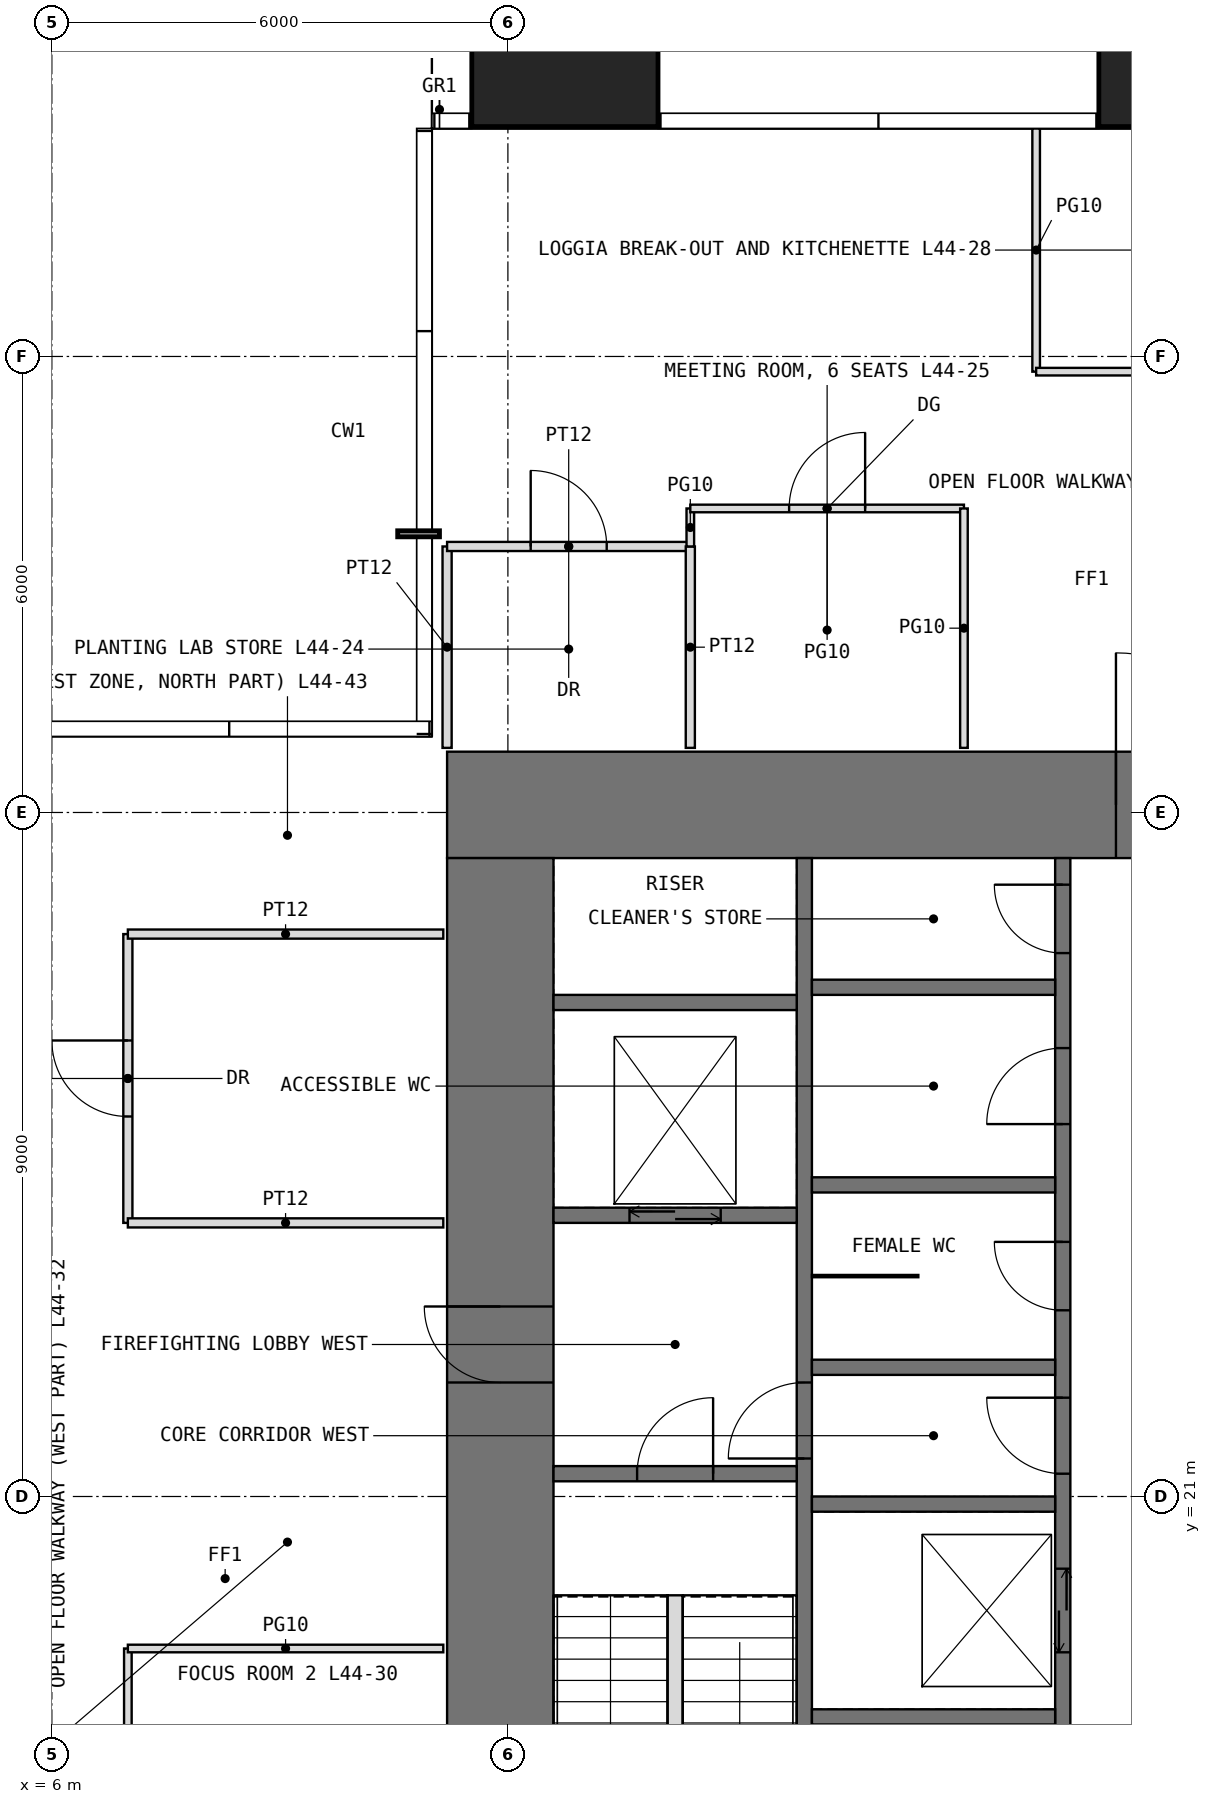
"""IFC4 building model, lengths in metres.
Left out: names, types, materials, properties, quantities, classifications, styles, units other than length and angle.
Written with IfcOpenShell. Run it as: python <this file> out.ifc"""

import sys

from ifc_helpers import new_model, si_unit, direction, frame, frame_2d, origin, origin_2d, place, context, subcontext, project, spatial, rectangle, extrude, element, fill, save


model = new_model("IFC4")
c1 = context("Model", 3, precision=1e-05, world=origin(), true_north=direction((0.0, 1.0)))
c2 = subcontext(c1, "Body", "Model", "MODEL_VIEW")
j1 = project(units=[si_unit("LENGTHUNIT", "METRE"), si_unit("PLANEANGLEUNIT", "RADIAN")], contexts=[c1])
p1 = place(None, origin())
s1 = spatial("IfcSite", under=j1, at=p1, CompositionType="ELEMENT")
p2 = place(p1, origin())
s2 = spatial("IfcBuilding", under=s1, at=p2, CompositionType="ELEMENT")
p3 = place(p2, frame((0.0, 0.0, 186.5)))
s3 = spatial("IfcBuildingStorey", under=s2, at=p3, CompositionType="ELEMENT", Elevation=186.5)
for number, where, z_axis, x_axis in (
    (1, (12.75, 40.25, 0.0), (0.0, 0.0, 1.0), (1.0, 0.0, 0.0)),
    (2, (21.0, 40.25, 0.0), (0.0, 0.0, 1.0), (1.0, 0.0, 0.0)),
):
    element("IfcColumn", number, at=place(p3, frame(where, z_axis=z_axis, x_axis=x_axis)), inside=s3, PredefinedType="COLUMN", context=c2, shape_type="SweptSolid", body=[
        extrude(rectangle(XDim=2.45, YDim=2.45, at=origin_2d()), origin(), (0.0, 0.0, 1.0), 4.0),
    ])
p4 = place(p3, frame((11.2, 30.1, -0.05), z_axis=(0.0, 0.0, 1.0), x_axis=(1.0, 0.0, 0.0)))
e3 = element("IfcWall", 3, at=p4, inside=s3, PredefinedType="SHEAR", context=c2, shape_type="SweptSolid", body=[
    extrude(rectangle(XDim=19.6, YDim=1.4, at=frame_2d((9.8, 0.0))), origin(), (0.0, 0.0, 1.0), 4.0),
])
p5 = place(p4, frame((8.8, 0.0, 0.05)))
e4 = element("IfcOpeningElement", 4, at=p5, cuts=e3, PredefinedType="OPENING", context=c2, shape_type="SweptSolid", body=[
    extrude(rectangle(XDim=2.0, YDim=2.2, at=frame_2d((1.0, 1.1))), frame((0.0, 0.71, 0.0), z_axis=(0.0, -1.0, 0.0), x_axis=(1.0, 0.0, 0.0)), (0.0, 0.0, 1.0), 1.42),
])
p6 = place(p3, frame((11.9, 12.6, -0.05), z_axis=(0.0, 0.0, 1.0), x_axis=(0.0, 1.0, 0.0)))
e5 = element("IfcWall", 5, at=p6, inside=s3, PredefinedType="SHEAR", context=c2, shape_type="SweptSolid", body=[
    extrude(rectangle(XDim=16.8, YDim=1.4, at=frame_2d((8.4, 0.0))), origin(), (0.0, 0.0, 1.0), 4.0),
])
p7 = place(p6, frame((9.9, 0.0, 0.05)))
e6 = element("IfcOpeningElement", 6, at=p7, cuts=e5, PredefinedType="OPENING", context=c2, shape_type="SweptSolid", body=[
    extrude(rectangle(XDim=1.0, YDim=2.2, at=frame_2d((0.5, 1.1))), frame((0.0, 0.71, 0.0), z_axis=(0.0, -1.0, 0.0), x_axis=(1.0, 0.0, 0.0)), (0.0, 0.0, 1.0), 1.42),
])
p8 = place(p3, frame((15.9, 12.6, -0.05), z_axis=(0.0, 0.0, 1.0), x_axis=(0.0, 1.0, 0.0)))
e7 = element("IfcWall", 7, at=p8, inside=s3, PredefinedType="SHEAR", context=c2, shape_type="SweptSolid", body=[
    extrude(rectangle(XDim=16.8, YDim=0.2, at=frame_2d((8.4, 0.0))), origin(), (0.0, 0.0, 1.0), 4.0),
])
p9 = place(p8, frame((8.9, 0.0, 0.05)))
e8 = element("IfcOpeningElement", 8, at=p9, cuts=e7, PredefinedType="OPENING", context=c2, shape_type="SweptSolid", body=[
    extrude(rectangle(XDim=1.0, YDim=2.2, at=frame_2d((0.5, 1.1))), frame((0.0, 0.11, 0.0), z_axis=(0.0, -1.0, 0.0), x_axis=(1.0, 0.0, 0.0)), (0.0, 0.0, 1.0), 0.22),
])
p10 = place(p3, frame((19.3, 12.6, -0.05), z_axis=(0.0, 0.0, 1.0), x_axis=(0.0, 1.0, 0.0)))
e9 = element("IfcWall", 9, at=p10, inside=s3, PredefinedType="SHEAR", context=c2, shape_type="SweptSolid", body=[
    extrude(rectangle(XDim=16.8, YDim=0.2, at=frame_2d((8.4, 0.0))), origin(), (0.0, 0.0, 1.0), 4.0),
])
p11 = place(p10, frame((8.7, 0.0, 0.05)))
e10 = element("IfcOpeningElement", 10, at=p11, cuts=e9, PredefinedType="OPENING", context=c2, shape_type="SweptSolid", body=[
    extrude(rectangle(XDim=1.0, YDim=2.2, at=frame_2d((0.5, 1.1))), frame((0.0, 0.11, 0.0), z_axis=(0.0, -1.0, 0.0), x_axis=(1.0, 0.0, 0.0)), (0.0, 0.0, 1.0), 0.22),
])
p12 = place(p10, frame((10.85, 0.0, 0.05)))
e11 = element("IfcOpeningElement", 11, at=p12, cuts=e9, PredefinedType="OPENING", context=c2, shape_type="SweptSolid", body=[
    extrude(rectangle(XDim=0.9, YDim=2.2, at=frame_2d((0.45, 1.1))), frame((0.0, 0.11, 0.0), z_axis=(0.0, -1.0, 0.0), x_axis=(1.0, 0.0, 0.0)), (0.0, 0.0, 1.0), 0.22),
])
p13 = place(p10, frame((13.3, 0.0, 0.05)))
e12 = element("IfcOpeningElement", 12, at=p13, cuts=e9, PredefinedType="OPENING", context=c2, shape_type="SweptSolid", body=[
    extrude(rectangle(XDim=1.0, YDim=2.2, at=frame_2d((0.5, 1.1))), frame((0.0, 0.11, 0.0), z_axis=(0.0, -1.0, 0.0), x_axis=(1.0, 0.0, 0.0)), (0.0, 0.0, 1.0), 0.22),
])
p14 = place(p10, frame((15.55, 0.0, 0.05)))
e13 = element("IfcOpeningElement", 13, at=p14, cuts=e9, PredefinedType="OPENING", context=c2, shape_type="SweptSolid", body=[
    extrude(rectangle(XDim=0.9, YDim=2.2, at=frame_2d((0.45, 1.1))), frame((0.0, 0.11, 0.0), z_axis=(0.0, -1.0, 0.0), x_axis=(1.0, 0.0, 0.0)), (0.0, 0.0, 1.0), 0.22),
])
p15 = place(p10, frame((0.75, 0.0, 0.05)))
e14 = element("IfcOpeningElement", 14, at=p15, cuts=e9, PredefinedType="OPENING", context=c2, shape_type="SweptSolid", body=[
    extrude(rectangle(XDim=1.1, YDim=2.2, at=frame_2d((0.55, 1.1))), frame((0.0, 0.11, 0.0), z_axis=(0.0, -1.0, 0.0), x_axis=(1.0, 0.0, 0.0)), (0.0, 0.0, 1.0), 0.22),
])
p16 = place(p10, frame((3.55, 0.0, 0.05)))
e15 = element("IfcOpeningElement", 15, at=p16, cuts=e9, PredefinedType="OPENING", context=c2, shape_type="SweptSolid", body=[
    extrude(rectangle(XDim=1.1, YDim=2.2, at=frame_2d((0.55, 1.1))), frame((0.0, 0.11, 0.0), z_axis=(0.0, -1.0, 0.0), x_axis=(1.0, 0.0, 0.0)), (0.0, 0.0, 1.0), 0.22),
])
p17 = place(p10, frame((6.35, 0.0, 0.05)))
e16 = element("IfcOpeningElement", 16, at=p17, cuts=e9, PredefinedType="OPENING", context=c2, shape_type="SweptSolid", body=[
    extrude(rectangle(XDim=1.1, YDim=2.2, at=frame_2d((0.55, 1.1))), frame((0.0, 0.11, 0.0), z_axis=(0.0, -1.0, 0.0), x_axis=(1.0, 0.0, 0.0)), (0.0, 0.0, 1.0), 0.22),
])
p18 = place(p3, frame((12.6, 21.3, -0.05), z_axis=(0.0, 0.0, 1.0), x_axis=(1.0, 0.0, 0.0)))
e17 = element("IfcWall", 17, at=p18, inside=s3, PredefinedType="SHEAR", context=c2, shape_type="SweptSolid", body=[
    extrude(rectangle(XDim=3.2, YDim=0.2, at=frame_2d((1.6, 0.0))), origin(), (0.0, 0.0, 1.0), 4.0),
])
p19 = place(p18, frame((1.1, 0.0, 0.05)))
e18 = element("IfcOpeningElement", 18, at=p19, cuts=e17, PredefinedType="OPENING", context=c2, shape_type="SweptSolid", body=[
    extrude(rectangle(XDim=1.0, YDim=2.2, at=frame_2d((0.5, 1.1))), frame((0.0, 0.11, 0.0), z_axis=(0.0, -1.0, 0.0), x_axis=(1.0, 0.0, 0.0)), (0.0, 0.0, 1.0), 0.22),
])
p20 = place(p3, frame((12.6, 24.7, -0.05), z_axis=(0.0, 0.0, 1.0), x_axis=(1.0, 0.0, 0.0)))
e19 = element("IfcWall", 19, at=p20, inside=s3, PredefinedType="SHEAR", context=c2, shape_type="SweptSolid", body=[
    extrude(rectangle(XDim=3.2, YDim=0.2, at=frame_2d((1.6, 0.0))), origin(), (0.0, 0.0, 1.0), 4.0),
])
p21 = place(p20, frame((1.0, 0.0, 0.05)))
e20 = element("IfcOpeningElement", 20, at=p21, cuts=e19, PredefinedType="OPENING", context=c2, shape_type="SweptSolid", body=[
    extrude(rectangle(XDim=1.2, YDim=2.2, at=frame_2d((0.6, 1.1))), frame((0.0, 0.11, 0.0), z_axis=(0.0, -1.0, 0.0), x_axis=(1.0, 0.0, 0.0)), (0.0, 0.0, 1.0), 0.22),
])
for number, where, z_axis, x_axis in (
    (21, (12.6, 27.5, -0.05), (0.0, 0.0, 1.0), (1.0, 0.0, 0.0)),
    (22, (16.0, 18.1, -0.05), (0.0, 0.0, 1.0), (1.0, 0.0, 0.0)),
    (23, (16.0, 20.9, -0.05), (0.0, 0.0, 1.0), (1.0, 0.0, 0.0)),
    (24, (16.0, 22.7, -0.05), (0.0, 0.0, 1.0), (1.0, 0.0, 0.0)),
    (25, (16.0, 25.1, -0.05), (0.0, 0.0, 1.0), (1.0, 0.0, 0.0)),
    (26, (16.0, 27.7, -0.05), (0.0, 0.0, 1.0), (1.0, 0.0, 0.0)),
):
    element("IfcWall", number, at=place(p3, frame(where, z_axis=z_axis, x_axis=x_axis)), inside=s3, PredefinedType="SHEAR", context=c2, shape_type="SweptSolid", body=[
        extrude(rectangle(XDim=3.2, YDim=0.2, at=frame_2d((1.6, 0.0))), origin(), (0.0, 0.0, 1.0), 4.0),
    ])
p22 = place(p3, frame((16.0, 23.9, 0.0), z_axis=(0.0, 0.0, 1.0), x_axis=(1.0, 0.0, 0.0)))
e27 = element("IfcWall", 27, at=p22, inside=s3, PredefinedType="PARTITIONING", context=c2, shape_type="SweptSolid", body=[
    extrude(rectangle(XDim=1.4, YDim=0.03, at=frame_2d((0.7, 0.0))), origin(), (0.0, 0.0, 1.0), 3.75),
])
p23 = place(p3, frame((7.0, 15.4, 0.0), z_axis=(0.0, 0.0, 1.0), x_axis=(0.0, 1.0, 0.0)))
e28 = element("IfcWall", 28, at=p23, inside=s3, PredefinedType="PARTITIONING", context=c2, shape_type="SweptSolid", body=[
    extrude(rectangle(XDim=3.6, YDim=0.1, at=frame_2d((1.8, 0.0))), origin(), (0.0, 0.0, 1.0), 3.75),
])
p24 = place(p23, frame((1.3, 0.0, 0.0)))
e29 = element("IfcOpeningElement", 29, at=p24, cuts=e28, PredefinedType="OPENING", context=c2, shape_type="SweptSolid", body=[
    extrude(rectangle(XDim=1.0, YDim=2.4, at=frame_2d((0.5, 1.2))), frame((0.0, 0.06, 0.0), z_axis=(0.0, -1.0, 0.0), x_axis=(1.0, 0.0, 0.0)), (0.0, 0.0, 1.0), 0.12),
])
p25 = place(p3, frame((7.0, 19.0, 0.0), z_axis=(0.0, 0.0, 1.0), x_axis=(1.0, 0.0, 0.0)))
e30 = element("IfcWall", 30, at=p25, inside=s3, PredefinedType="PARTITIONING", context=c2, shape_type="SweptSolid", body=[
    extrude(rectangle(XDim=4.15, YDim=0.1, at=frame_2d((2.075, 0.0))), origin(), (0.0, 0.0, 1.0), 3.75),
])
p26 = place(p3, frame((7.0, 24.6, 0.0), z_axis=(0.0, 0.0, 1.0), x_axis=(0.0, 1.0, 0.0)))
e31 = element("IfcWall", 31, at=p26, inside=s3, PredefinedType="PARTITIONING", context=c2, shape_type="SweptSolid", body=[
    extrude(rectangle(XDim=3.8, YDim=0.12, at=frame_2d((1.9, 0.0))), origin(), (0.0, 0.0, 1.0), 3.75),
])
p27 = place(p26, frame((1.4, 0.0, 0.0)))
e32 = element("IfcOpeningElement", 32, at=p27, cuts=e31, PredefinedType="OPENING", context=c2, shape_type="SweptSolid", body=[
    extrude(rectangle(XDim=1.0, YDim=2.2, at=frame_2d((0.5, 1.1))), frame((0.0, 0.07, 0.0), z_axis=(0.0, -1.0, 0.0), x_axis=(1.0, 0.0, 0.0)), (0.0, 0.0, 1.0), 0.14),
])
for number, where, z_axis, x_axis in (
    (33, (7.0, 24.6, 0.0), (0.0, 0.0, 1.0), (1.0, 0.0, 0.0)),
    (34, (7.0, 28.4, 0.0), (0.0, 0.0, 1.0), (1.0, 0.0, 0.0)),
):
    element("IfcWall", number, at=place(p3, frame(where, z_axis=z_axis, x_axis=x_axis)), inside=s3, PredefinedType="PARTITIONING", context=c2, shape_type="SweptSolid", body=[
        extrude(rectangle(XDim=4.15, YDim=0.12, at=frame_2d((2.075, 0.0))), origin(), (0.0, 0.0, 1.0), 3.75),
    ])
p28 = place(p3, frame((11.2, 30.85, 0.0), z_axis=(0.0, 0.0, 1.0), x_axis=(0.0, 1.0, 0.0)))
e35 = element("IfcWall", 35, at=p28, inside=s3, PredefinedType="PARTITIONING", context=c2, shape_type="SweptSolid", body=[
    extrude(rectangle(XDim=2.65, YDim=0.12, at=frame_2d((1.325, 0.0))), origin(), (0.0, 0.0, 1.0), 3.75),
])
p29 = place(p3, frame((11.2, 33.5, 0.0), z_axis=(0.0, 0.0, 1.0), x_axis=(1.0, 0.0, 0.0)))
e36 = element("IfcWall", 36, at=p29, inside=s3, PredefinedType="PARTITIONING", context=c2, shape_type="SweptSolid", body=[
    extrude(rectangle(XDim=3.2, YDim=0.12, at=frame_2d((1.6, 0.0))), origin(), (0.0, 0.0, 1.0), 3.75),
])
p30 = place(p29, frame((1.1, 0.0, 0.0)))
e37 = element("IfcOpeningElement", 37, at=p30, cuts=e36, PredefinedType="OPENING", context=c2, shape_type="SweptSolid", body=[
    extrude(rectangle(XDim=1.0, YDim=2.2, at=frame_2d((0.5, 1.1))), frame((0.0, 0.07, 0.0), z_axis=(0.0, -1.0, 0.0), x_axis=(1.0, 0.0, 0.0)), (0.0, 0.0, 1.0), 0.14),
])
p31 = place(p3, frame((14.4, 30.85, 0.0), z_axis=(0.0, 0.0, 1.0), x_axis=(0.0, 1.0, 0.0)))
e38 = element("IfcWall", 38, at=p31, inside=s3, PredefinedType="PARTITIONING", context=c2, shape_type="SweptSolid", body=[
    extrude(rectangle(XDim=2.65, YDim=0.12, at=frame_2d((1.325, 0.0))), origin(), (0.0, 0.0, 1.0), 3.75),
])
p32 = place(p3, frame((14.4, 33.5, 0.0), z_axis=(0.0, 0.0, 1.0), x_axis=(0.0, 1.0, 0.0)))
e39 = element("IfcWall", 39, at=p32, inside=s3, PredefinedType="PARTITIONING", context=c2, shape_type="SweptSolid", body=[
    extrude(rectangle(XDim=0.5, YDim=0.1, at=frame_2d((0.25, 0.0))), origin(), (0.0, 0.0, 1.0), 3.75),
])
p33 = place(p3, frame((14.4, 34.0, 0.0), z_axis=(0.0, 0.0, 1.0), x_axis=(1.0, 0.0, 0.0)))
e40 = element("IfcWall", 40, at=p33, inside=s3, PredefinedType="PARTITIONING", context=c2, shape_type="SweptSolid", body=[
    extrude(rectangle(XDim=3.6, YDim=0.1, at=frame_2d((1.8, 0.0))), origin(), (0.0, 0.0, 1.0), 3.75),
])
p34 = place(p33, frame((1.3, 0.0, 0.0)))
e41 = element("IfcOpeningElement", 41, at=p34, cuts=e40, PredefinedType="OPENING", context=c2, shape_type="SweptSolid", body=[
    extrude(rectangle(XDim=1.0, YDim=2.4, at=frame_2d((0.5, 1.2))), frame((0.0, 0.06, 0.0), z_axis=(0.0, -1.0, 0.0), x_axis=(1.0, 0.0, 0.0)), (0.0, 0.0, 1.0), 0.12),
])
p35 = place(p3, frame((18.0, 30.85, 0.0), z_axis=(0.0, 0.0, 1.0), x_axis=(0.0, 1.0, 0.0)))
e42 = element("IfcWall", 42, at=p35, inside=s3, PredefinedType="PARTITIONING", context=c2, shape_type="SweptSolid", body=[
    extrude(rectangle(XDim=3.15, YDim=0.1, at=frame_2d((1.575, 0.0))), origin(), (0.0, 0.0, 1.0), 3.75),
])
p36 = place(p3, frame((18.95, 35.8, 0.0), z_axis=(0.0, 0.0, 1.0), x_axis=(0.0, 1.0, 0.0)))
e43 = element("IfcWall", 43, at=p36, inside=s3, PredefinedType="PARTITIONING", context=c2, shape_type="SweptSolid", body=[
    extrude(rectangle(XDim=3.2, YDim=0.1, at=frame_2d((1.6, 0.0))), origin(), (0.0, 0.0, 1.0), 3.75),
])
p37 = place(p3, frame((18.95, 35.8, 0.0), z_axis=(0.0, 0.0, 1.0), x_axis=(1.0, 0.0, 0.0)))
e44 = element("IfcWall", 44, at=p37, inside=s3, PredefinedType="PARTITIONING", context=c2, shape_type="SweptSolid", body=[
    extrude(rectangle(XDim=9.25, YDim=0.1, at=frame_2d((4.625, 0.0))), origin(), (0.0, 0.0, 1.0), 3.75),
])
p38 = place(p37, frame((4.125, 0.0, 0.0)))
e45 = element("IfcOpeningElement", 45, at=p38, cuts=e44, PredefinedType="OPENING", context=c2, shape_type="SweptSolid", body=[
    extrude(rectangle(XDim=1.0, YDim=2.4, at=frame_2d((0.5, 1.2))), frame((0.0, 0.06, 0.0), z_axis=(0.0, -1.0, 0.0), x_axis=(1.0, 0.0, 0.0)), (0.0, 0.0, 1.0), 0.12),
])
p39 = place(p3, frame((14.2, 16.62, 0.0), z_axis=(0.0, 0.0, 1.0), x_axis=(0.0, 1.0, 0.0)))
e46 = element("IfcWall", 46, at=p39, inside=s3, PredefinedType="PARTITIONING", context=c2, shape_type="SweptSolid", body=[
    extrude(rectangle(XDim=3.08, YDim=0.2, at=frame_2d((1.54, 0.0))), origin(), (0.0, 0.0, 1.0), 4.0),
])
p40 = place(p5, origin())
e47 = element("IfcDoor", 47, at=p40, inside=s3, OperationType="DOUBLE_DOOR_SINGLE_SWING", PredefinedType="DOOR", context=c2, shape_type="SweptSolid", body=[
    extrude(rectangle(XDim=2.0, YDim=2.2, at=frame_2d((1.0, 1.1))), frame((0.0, 0.025, 0.0), z_axis=(0.0, -1.0, 0.0), x_axis=(1.0, 0.0, 0.0)), (0.0, 0.0, 1.0), 0.05),
])
fill(e4, e47)
p41 = place(p7, origin())
e48 = element("IfcDoor", 48, at=p41, inside=s3, OperationType="SINGLE_SWING_RIGHT", PredefinedType="DOOR", context=c2, shape_type="SweptSolid", body=[
    extrude(rectangle(XDim=1.0, YDim=2.2, at=frame_2d((0.5, 1.1))), frame((0.0, 0.025, 0.0), z_axis=(0.0, -1.0, 0.0), x_axis=(1.0, 0.0, 0.0)), (0.0, 0.0, 1.0), 0.05),
])
fill(e6, e48)
p42 = place(p19, origin())
e49 = element("IfcDoor", 49, at=p42, inside=s3, OperationType="SINGLE_SWING_RIGHT", PredefinedType="DOOR", context=c2, shape_type="SweptSolid", body=[
    extrude(rectangle(XDim=1.0, YDim=2.2, at=frame_2d((0.5, 1.1))), frame((0.0, 0.025, 0.0), z_axis=(0.0, -1.0, 0.0), x_axis=(1.0, 0.0, 0.0)), (0.0, 0.0, 1.0), 0.05),
])
fill(e18, e49)
p43 = place(p9, origin())
e50 = element("IfcDoor", 50, at=p43, inside=s3, OperationType="SINGLE_SWING_LEFT", PredefinedType="DOOR", context=c2, shape_type="SweptSolid", body=[
    extrude(rectangle(XDim=1.0, YDim=2.2, at=frame_2d((0.5, 1.1))), frame((0.0, 0.025, 0.0), z_axis=(0.0, -1.0, 0.0), x_axis=(1.0, 0.0, 0.0)), (0.0, 0.0, 1.0), 0.05),
])
fill(e8, e50)
p44 = place(p11, origin())
e51 = element("IfcDoor", 51, at=p44, inside=s3, OperationType="SINGLE_SWING_RIGHT", PredefinedType="DOOR", context=c2, shape_type="SweptSolid", body=[
    extrude(rectangle(XDim=1.0, YDim=2.2, at=frame_2d((0.5, 1.1))), frame((0.0, 0.025, 0.0), z_axis=(0.0, -1.0, 0.0), x_axis=(1.0, 0.0, 0.0)), (0.0, 0.0, 1.0), 0.05),
])
fill(e10, e51)
p45 = place(p12, origin())
e52 = element("IfcDoor", 52, at=p45, inside=s3, OperationType="SINGLE_SWING_RIGHT", PredefinedType="DOOR", context=c2, shape_type="SweptSolid", body=[
    extrude(rectangle(XDim=0.9, YDim=2.2, at=frame_2d((0.45, 1.1))), frame((0.0, 0.025, 0.0), z_axis=(0.0, -1.0, 0.0), x_axis=(1.0, 0.0, 0.0)), (0.0, 0.0, 1.0), 0.05),
])
fill(e11, e52)
p46 = place(p13, origin())
e53 = element("IfcDoor", 53, at=p46, inside=s3, OperationType="SINGLE_SWING_LEFT", PredefinedType="DOOR", context=c2, shape_type="SweptSolid", body=[
    extrude(rectangle(XDim=1.0, YDim=2.2, at=frame_2d((0.5, 1.1))), frame((0.0, 0.025, 0.0), z_axis=(0.0, -1.0, 0.0), x_axis=(1.0, 0.0, 0.0)), (0.0, 0.0, 1.0), 0.05),
])
fill(e12, e53)
p47 = place(p14, origin())
e54 = element("IfcDoor", 54, at=p47, inside=s3, OperationType="SINGLE_SWING_RIGHT", PredefinedType="DOOR", context=c2, shape_type="SweptSolid", body=[
    extrude(rectangle(XDim=0.9, YDim=2.2, at=frame_2d((0.45, 1.1))), frame((0.0, 0.025, 0.0), z_axis=(0.0, -1.0, 0.0), x_axis=(1.0, 0.0, 0.0)), (0.0, 0.0, 1.0), 0.05),
])
fill(e13, e54)
p48 = place(p30, origin())
e55 = element("IfcDoor", 55, at=p48, inside=s3, OperationType="SINGLE_SWING_LEFT", PredefinedType="DOOR", context=c2, shape_type="SweptSolid", body=[
    extrude(rectangle(XDim=1.0, YDim=2.2, at=frame_2d((0.5, 1.1))), frame((0.0, 0.025, 0.0), z_axis=(0.0, -1.0, 0.0), x_axis=(1.0, 0.0, 0.0)), (0.0, 0.0, 1.0), 0.05),
])
fill(e37, e55)
p49 = place(p34, origin())
e56 = element("IfcDoor", 56, at=p49, inside=s3, OperationType="SINGLE_SWING_RIGHT", PredefinedType="DOOR", context=c2, shape_type="SweptSolid", body=[
    extrude(rectangle(XDim=1.0, YDim=2.4, at=frame_2d((0.5, 1.2))), frame((0.0, 0.025, 0.0), z_axis=(0.0, -1.0, 0.0), x_axis=(1.0, 0.0, 0.0)), (0.0, 0.0, 1.0), 0.05),
])
fill(e41, e56)
p50 = place(p27, origin())
e57 = element("IfcDoor", 57, at=p50, inside=s3, OperationType="SINGLE_SWING_RIGHT", PredefinedType="DOOR", context=c2, shape_type="SweptSolid", body=[
    extrude(rectangle(XDim=1.0, YDim=2.2, at=frame_2d((0.5, 1.1))), frame((0.0, 0.025, 0.0), z_axis=(0.0, -1.0, 0.0), x_axis=(1.0, 0.0, 0.0)), (0.0, 0.0, 1.0), 0.05),
])
fill(e32, e57)
p51 = place(p17, origin())
e58 = element("IfcDoor", 58, at=p51, inside=s3, OperationType="DOUBLE_DOOR_SLIDING", PredefinedType="DOOR", context=c2, shape_type="SweptSolid", body=[
    extrude(rectangle(XDim=1.1, YDim=2.2, at=frame_2d((0.55, 1.1))), frame((0.0, 0.025, 0.0), z_axis=(0.0, -1.0, 0.0), x_axis=(1.0, 0.0, 0.0)), (0.0, 0.0, 1.0), 0.05),
])
fill(e16, e58)
p52 = place(p21, origin())
e59 = element("IfcDoor", 59, at=p52, inside=s3, OperationType="DOUBLE_DOOR_SLIDING", PredefinedType="DOOR", context=c2, shape_type="SweptSolid", body=[
    extrude(rectangle(XDim=1.2, YDim=2.2, at=frame_2d((0.6, 1.1))), frame((0.0, 0.025, 0.0), z_axis=(0.0, -1.0, 0.0), x_axis=(1.0, 0.0, 0.0)), (0.0, 0.0, 1.0), 0.05),
])
fill(e20, e59)
save(model, sys.argv[1])
